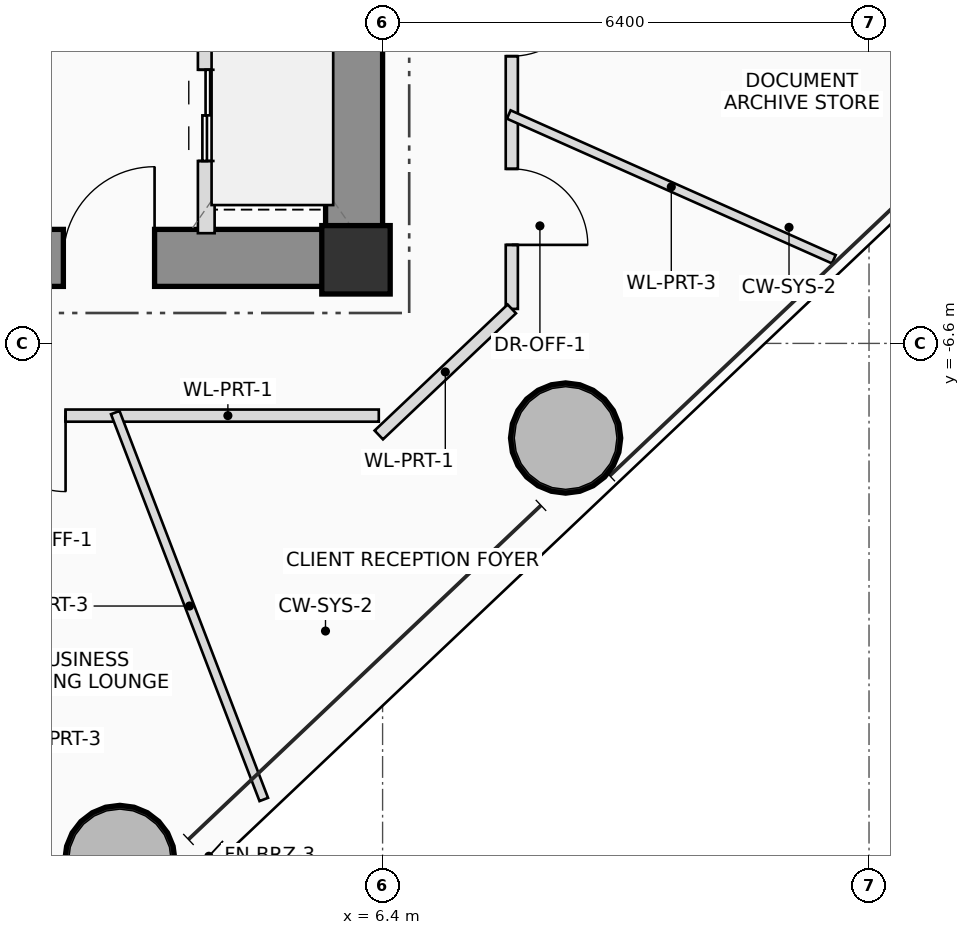
"""IFC4 building model, lengths in metres.
Left out: names, types, materials, properties, quantities, classifications, styles, units other than length and angle.
Written with IfcOpenShell. Run it as: python <this file> out.ifc"""

import sys

from ifc_helpers import new_model, si_unit, direction, frame, frame_2d, origin, origin_2d, place, context, subcontext, project, spatial, rectangle, hollow_circle, extrude, source, transform, mapped, element, fill, save


model = new_model("IFC4")
c1 = context("Model", 3, precision=1e-05, world=origin(), true_north=direction((0.0, 1.0)))
c2 = subcontext(c1, "Body", "Model", "MODEL_VIEW")
j1 = project(units=[si_unit("LENGTHUNIT", "METRE"), si_unit("PLANEANGLEUNIT", "RADIAN")], contexts=[c1])
p1 = place(None, origin())
s1 = spatial("IfcSite", under=j1, at=p1, CompositionType="ELEMENT")
p2 = place(p1, origin())
s2 = spatial("IfcBuilding", under=s1, at=p2, CompositionType="ELEMENT")
p3 = place(p2, frame((0.0, 0.0, 104.9)))
s3 = spatial("IfcBuildingStorey", under=s2, at=p3, CompositionType="ELEMENT", Elevation=104.9)
m1 = source(origin(), c2, "Body", "SweptSolid", [
    extrude(rectangle(XDim=0.9, YDim=0.9, at=origin_2d()), origin(), (0.0, 0.0, 1.0), 3.75),
])
p4 = place(p3, frame((6.05, -5.5, 0.0), z_axis=(0.0, 0.0, 1.0), x_axis=(1.0, 0.0, 0.0)))
e1 = element("IfcColumn", 1, at=p4, inside=s3, PredefinedType="COLUMN", context=c2, shape_type="MappedRepresentation", body=[
    mapped(m1, transform((0.0, 0.0, 0.0), scale=1.0)),
])
p5 = place(p3, frame((-6.4, -5.475, 0.0), z_axis=(0.0, 0.0, 1.0), x_axis=(1.0, 0.0, 0.0)))
e2 = element("IfcWall", 2, at=p5, inside=s3, PredefinedType="SHEAR", context=c2, shape_type="SweptSolid", body=[
    extrude(rectangle(XDim=12.8, YDim=0.75, at=frame_2d((6.4, 0.0))), origin(), (0.0, 0.0, 1.0), 3.75),
])
p6 = place(p5, frame((8.6, 0.0, 0.0)))
e3 = element("IfcOpeningElement", 3, at=p6, cuts=e2, PredefinedType="OPENING", context=c2, shape_type="SweptSolid", body=[
    extrude(rectangle(XDim=1.2, YDim=2.2, at=frame_2d((0.6, 1.1))), frame((0.0, 0.385, 0.0), z_axis=(0.0, -1.0, 0.0), x_axis=(1.0, 0.0, 0.0)), (0.0, 0.0, 1.0), 0.77),
])
p7 = place(p3, frame((6.025, -5.1, 0.0), z_axis=(0.0, 0.0, 1.0), x_axis=(0.0, 1.0, 0.0)))
e4 = element("IfcWall", 4, at=p7, inside=s3, PredefinedType="SHEAR", context=c2, shape_type="SweptSolid", body=[
    extrude(rectangle(XDim=10.2, YDim=0.75, at=frame_2d((5.1, 0.0))), origin(), (0.0, 0.0, 1.0), 3.75),
])
m2 = source(origin(), c2, "Body", "SweptSolid", [
    extrude(hollow_circle(Radius=0.725, WallThickness=0.05, at=origin_2d()), origin(), (0.0, 0.0, 1.0), 3.75),
])
for number, where, z_axis, x_axis in (
    (5, (2.943, -13.402, 0.0), (0.0, 0.0, 1.0), (1.0, 0.0, 0.0)),
    (6, (8.808, -7.845, 0.0), (0.0, 0.0, 1.0), (1.0, 0.0, 0.0)),
):
    element("IfcColumn", number, at=place(p3, frame(where, z_axis=z_axis, x_axis=x_axis)), inside=s3, PredefinedType="COLUMN", context=c2, shape_type="MappedRepresentation", body=[
        mapped(m2, transform((0.0, 0.0, 0.0), scale=1.0)),
    ])
p8 = place(p3, frame((4.08, -5.15, 0.0), z_axis=(0.0, 0.0, 1.0), x_axis=(0.0, 1.0, 0.0)))
e7 = element("IfcWall", 7, at=p8, inside=s3, PredefinedType="PLUMBINGWALL", context=c2, shape_type="SweptSolid", body=[
    extrude(rectangle(XDim=2.95, YDim=0.22, at=frame_2d((1.475, 0.0))), origin(), (0.0, 0.0, 1.0), 3.545),
])
p9 = place(p8, frame((0.95, 0.0, 0.0)))
e8 = element("IfcOpeningElement", 8, at=p9, cuts=e7, PredefinedType="OPENING", context=c2, shape_type="SweptSolid", body=[
    extrude(rectangle(XDim=1.2, YDim=2.25, at=frame_2d((0.6, 1.125))), frame((0.0, 0.12, 0.0), z_axis=(0.0, -1.0, 0.0), x_axis=(1.0, 0.0, 0.0)), (0.0, 0.0, 1.0), 0.24),
])
p10 = place(p3, frame((8.1, -0.02, 0.0), z_axis=(0.0, 0.0, 1.0), x_axis=(0.0, -1.0, 0.0)))
e9 = element("IfcWall", 9, at=p10, inside=s3, PredefinedType="PARTITIONING", context=c2, shape_type="SweptSolid", body=[
    extrude(rectangle(XDim=6.126, YDim=0.16, at=frame_2d((3.063, 0.0))), origin(), (0.0, 0.0, 1.0), 2.85),
])
p11 = place(p10, frame((1.801, 0.0, 0.0)))
e10 = element("IfcOpeningElement", 10, at=p11, cuts=e9, PredefinedType="OPENING", context=c2, shape_type="SweptSolid", body=[
    extrude(rectangle(XDim=1.0, YDim=2.25, at=frame_2d((0.5, 1.125))), frame((0.0, 0.09, 0.0), z_axis=(0.0, -1.0, 0.0), x_axis=(1.0, 0.0, 0.0)), (0.0, 0.0, 1.0), 0.18),
])
p12 = place(p10, frame((4.284, 0.0, 0.0)))
e11 = element("IfcOpeningElement", 11, at=p12, cuts=e9, PredefinedType="OPENING", context=c2, shape_type="SweptSolid", body=[
    extrude(rectangle(XDim=1.0, YDim=2.25, at=frame_2d((0.5, 1.125))), frame((0.0, 0.09, 0.0), z_axis=(0.0, -1.0, 0.0), x_axis=(1.0, 0.0, 0.0)), (0.0, 0.0, 1.0), 0.18),
])
p13 = place(p3, frame((8.1, -6.146, 0.0), z_axis=(0.0, 0.0, 1.0), x_axis=(-0.725888815428, -0.687812058368, 0.0)))
e12 = element("IfcWall", 12, at=p13, inside=s3, PredefinedType="PARTITIONING", context=c2, shape_type="SweptSolid", body=[
    extrude(rectangle(XDim=2.411, YDim=0.16, at=frame_2d((1.206, 0.0))), origin(), (0.0, 0.0, 1.0), 2.85),
])
p14 = place(p3, frame((6.35, -7.55, 0.0), z_axis=(0.0, 0.0, 1.0), x_axis=(-1.0, 0.0, 0.0)))
e13 = element("IfcWall", 13, at=p14, inside=s3, PredefinedType="PARTITIONING", context=c2, shape_type="SweptSolid", body=[
    extrude(rectangle(XDim=12.7, YDim=0.16, at=frame_2d((6.35, 0.0))), origin(), (0.0, 0.0, 1.0), 2.85),
])
p15 = place(p14, frame((4.121, 0.0, 0.0)))
e14 = element("IfcOpeningElement", 14, at=p15, cuts=e13, PredefinedType="OPENING", context=c2, shape_type="SweptSolid", body=[
    extrude(rectangle(XDim=1.0, YDim=2.25, at=frame_2d((0.5, 1.125))), frame((0.0, 0.09, 0.0), z_axis=(0.0, -1.0, 0.0), x_axis=(1.0, 0.0, 0.0)), (0.0, 0.0, 1.0), 0.18),
])
p16 = place(p14, frame((7.966, 0.0, 0.0)))
e15 = element("IfcOpeningElement", 15, at=p16, cuts=e13, PredefinedType="OPENING", context=c2, shape_type="SweptSolid", body=[
    extrude(rectangle(XDim=1.0, YDim=2.25, at=frame_2d((0.5, 1.125))), frame((0.0, 0.09, 0.0), z_axis=(0.0, -1.0, 0.0), x_axis=(1.0, 0.0, 0.0)), (0.0, 0.0, 1.0), 0.18),
])
p17 = place(p3, frame((2.883, -7.51, 0.0), z_axis=(0.0, 0.0, 1.0), x_axis=(0.35836087515, -0.933583142072, 0.0)))
e16 = element("IfcWall", 16, at=p17, inside=s3, PredefinedType="PARTITIONING", context=c2, shape_type="SweptSolid", body=[
    extrude(rectangle(XDim=5.452, YDim=0.12, at=frame_2d((2.726, 0.0))), origin(), (0.0, 0.0, 1.0), 2.85),
])
p18 = place(p3, frame((8.06, -3.588, 0.0), z_axis=(0.0, 0.0, 1.0), x_axis=(0.913536081089, -0.406757702506, 0.0)))
e17 = element("IfcWall", 17, at=p18, inside=s3, PredefinedType="PARTITIONING", context=c2, shape_type="SweptSolid", body=[
    extrude(rectangle(XDim=4.682, YDim=0.12, at=frame_2d((2.341, 0.0))), origin(), (0.0, 0.0, 1.0), 2.85),
])
p19 = place(p6, origin())
e18 = element("IfcDoor", 18, at=p19, inside=s3, OperationType="SINGLE_SWING_RIGHT", PredefinedType="DOOR", context=c2, shape_type="SweptSolid", body=[
    extrude(rectangle(XDim=1.2, YDim=2.2, at=frame_2d((0.6, 1.1))), frame((0.0, 0.025, 0.0), z_axis=(0.0, -1.0, 0.0), x_axis=(1.0, 0.0, 0.0)), (0.0, 0.0, 1.0), 0.05),
])
fill(e3, e18)
p20 = place(p9, origin())
e19 = element("IfcDoor", 19, at=p20, inside=s3, OperationType="DOUBLE_DOOR_SLIDING", PredefinedType="DOOR", context=c2, shape_type="SweptSolid", body=[
    extrude(rectangle(XDim=1.2, YDim=2.25, at=frame_2d((0.6, 1.125))), frame((0.0, 0.025, 0.0), z_axis=(0.0, -1.0, 0.0), x_axis=(1.0, 0.0, 0.0)), (0.0, 0.0, 1.0), 0.05),
])
fill(e8, e19)
p21 = place(p11, origin())
e20 = element("IfcDoor", 20, at=p21, inside=s3, OperationType="SINGLE_SWING_LEFT", PredefinedType="DOOR", context=c2, shape_type="SweptSolid", body=[
    extrude(rectangle(XDim=1.0, YDim=2.25, at=frame_2d((0.5, 1.125))), frame((0.0, 0.025, 0.0), z_axis=(0.0, -1.0, 0.0), x_axis=(1.0, 0.0, 0.0)), (0.0, 0.0, 1.0), 0.05),
])
fill(e10, e20)
p22 = place(p12, origin())
e21 = element("IfcDoor", 21, at=p22, inside=s3, OperationType="SINGLE_SWING_RIGHT", PredefinedType="DOOR", context=c2, shape_type="SweptSolid", body=[
    extrude(rectangle(XDim=1.0, YDim=2.25, at=frame_2d((0.5, 1.125))), frame((0.0, 0.025, 0.0), z_axis=(0.0, -1.0, 0.0), x_axis=(1.0, 0.0, 0.0)), (0.0, 0.0, 1.0), 0.05),
])
fill(e11, e21)
p23 = place(p15, origin())
e22 = element("IfcDoor", 22, at=p23, inside=s3, OperationType="SINGLE_SWING_LEFT", PredefinedType="DOOR", context=c2, shape_type="SweptSolid", body=[
    extrude(rectangle(XDim=1.0, YDim=2.25, at=frame_2d((0.5, 1.125))), frame((0.0, 0.025, 0.0), z_axis=(0.0, -1.0, 0.0), x_axis=(1.0, 0.0, 0.0)), (0.0, 0.0, 1.0), 0.05),
])
fill(e14, e22)
save(model, sys.argv[1])
